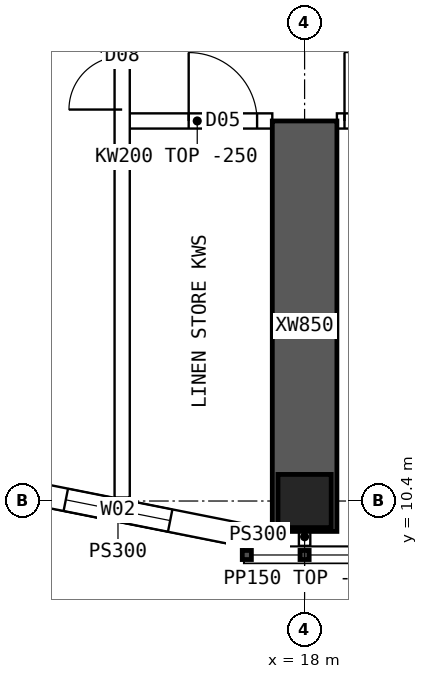
"""IFC4 building model, lengths in metres.
Left out: names, types, materials, properties, quantities, classifications, styles, units other than length and angle.
Written with IfcOpenShell. Run it as: python <this file> out.ifc"""

import sys

from ifc_helpers import new_model, si_unit, direction, frame, frame_2d, origin, origin_2d, place, context, subcontext, project, spatial, polyline, rectangle, hollow_rectangle, outline, extrude, element, fill, save


model = new_model("IFC4")
c1 = context("Model", 3, precision=1e-05, world=origin(), true_north=direction((0.0, 1.0)))
c2 = subcontext(c1, "Body", "Model", "MODEL_VIEW")
j1 = project(units=[si_unit("LENGTHUNIT", "METRE"), si_unit("PLANEANGLEUNIT", "RADIAN")], contexts=[c1])
p1 = place(None, origin())
s1 = spatial("IfcSite", under=j1, at=p1, CompositionType="ELEMENT")
p2 = place(p1, origin())
s2 = spatial("IfcBuilding", under=s1, at=p2, CompositionType="ELEMENT")
p3 = place(p2, frame((0.0, 0.0, 193.6)))
s3 = spatial("IfcBuildingStorey", under=s2, at=p3, CompositionType="ELEMENT", Elevation=193.6)
p4 = place(p3, frame((18.0, 10.4, 0.0), z_axis=(0.0, 0.0, 1.0), x_axis=(1.0, 0.0, 0.0)))
e1 = element("IfcColumn", 1, at=p4, inside=s3, PredefinedType="COLUMN", context=c2, shape_type="SweptSolid", body=[
    extrude(hollow_rectangle(XDim=0.7, YDim=0.7, WallThickness=0.07, at=origin_2d()), origin(), (0.0, 0.0, 1.0), 3.75),
])
p5 = place(p3, frame((18.0, 10.0, 0.0), z_axis=(0.0, 0.0, 1.0), x_axis=(0.0, 1.0, 0.0)))
e2 = element("IfcWall", 2, at=p5, inside=s3, PredefinedType="SHEAR", context=c2, shape_type="SweptSolid", body=[
    extrude(rectangle(XDim=5.4, YDim=0.85, at=frame_2d((2.7, 0.0))), origin(), (0.0, 0.0, 1.0), 3.75),
])
p6 = place(p3, frame((13.89, 10.608, 0.0), z_axis=(0.0, 0.0, 1.0), x_axis=(0.98078325777, -0.195100490205, 0.0)))
e3 = element("IfcWall", 3, at=p6, inside=s3, PredefinedType="SOLIDWALL", context=c2, shape_type="SweptSolid", body=[
    extrude(outline(polyline([(-0.03, -0.15), (3.405, -0.15), (3.345, 0.15), (0.03, 0.15), (-0.03, -0.15)])), origin(), (0.0, 0.0, 1.0), 3.5),
])
p7 = place(p6, frame((0.988, 0.0, 0.9)))
e4 = element("IfcOpeningElement", 4, at=p7, cuts=e3, PredefinedType="OPENING", context=c2, shape_type="SweptSolid", body=[
    extrude(rectangle(XDim=1.4, YDim=1.8, at=frame_2d((0.7, 0.9))), frame((0.0, 0.16, 0.0), z_axis=(0.0, -1.0, 0.0), x_axis=(1.0, 0.0, 0.0)), (0.0, 0.0, 1.0), 0.32),
])
p8 = place(p3, frame((17.2, 9.95, 0.0), z_axis=(0.0, 0.0, 1.0), x_axis=(1.0, 0.0, 0.0)))
e5 = element("IfcWall", 5, at=p8, inside=s3, PredefinedType="SOLIDWALL", context=c2, shape_type="SweptSolid", body=[
    extrude(rectangle(XDim=0.375, YDim=0.3, at=frame_2d((0.188, 0.0))), origin(), (0.0, 0.0, 1.0), 3.5),
])
p9 = place(p3, frame((15.6, 15.4, 0.0), z_axis=(0.0, 0.0, 1.0), x_axis=(1.0, 0.0, 0.0)))
e6 = element("IfcWall", 6, at=p9, inside=s3, PredefinedType="SOLIDWALL", context=c2, shape_type="SweptSolid", body=[
    extrude(rectangle(XDim=1.975, YDim=0.2, at=frame_2d((0.987, 0.0))), origin(), (0.0, 0.0, 1.0), 3.5),
])
p10 = place(p9, frame((0.875, 0.0, 0.0)))
e7 = element("IfcOpeningElement", 7, at=p10, cuts=e6, PredefinedType="OPENING", context=c2, shape_type="SweptSolid", body=[
    extrude(rectangle(XDim=0.9, YDim=2.1, at=frame_2d((0.45, 1.05))), frame((0.0, 0.11, 0.0), z_axis=(0.0, -1.0, 0.0), x_axis=(1.0, 0.0, 0.0)), (0.0, 0.0, 1.0), 0.22),
])
p11 = place(p3, frame((18.425, 15.4, 0.0), z_axis=(0.0, 0.0, 1.0), x_axis=(1.0, 0.0, 0.0)))
e8 = element("IfcWall", 8, at=p11, inside=s3, PredefinedType="SOLIDWALL", context=c2, shape_type="SweptSolid", body=[
    extrude(outline(polyline([(0.0, 0.0), (5.15, 0.0), (5.15, 3.1), (0.0, 3.1), (0.0, 0.0)])), frame((0.0, 0.1, 0.0), z_axis=(0.0, -1.0, 0.0), x_axis=(1.0, 0.0, 0.0)), (0.0, 0.0, 1.0), 0.2),
])
p12 = place(p11, frame((0.1, 0.0, 0.0)))
e9 = element("IfcOpeningElement", 9, at=p12, cuts=e8, PredefinedType="OPENING", context=c2, shape_type="SweptSolid", body=[
    extrude(rectangle(XDim=0.9, YDim=2.1, at=frame_2d((0.45, 1.05))), frame((0.0, 0.11, 0.0), z_axis=(0.0, -1.0, 0.0), x_axis=(1.0, 0.0, 0.0)), (0.0, 0.0, 1.0), 0.22),
])
p13 = place(p3, frame((15.6, 10.446, 0.0), z_axis=(0.0, 0.0, 1.0), x_axis=(0.0, 1.0, 0.0)))
e10 = element("IfcWall", 10, at=p13, inside=s3, PredefinedType="SOLIDWALL", context=c2, shape_type="SweptSolid", body=[
    extrude(rectangle(XDim=43.107, YDim=0.2, at=frame_2d((21.554, 0.0))), origin(), (0.0, 0.0, 1.0), 3.5),
])
p14 = place(p13, frame((5.104, 0.0, 0.0)))
e11 = element("IfcOpeningElement", 11, at=p14, cuts=e10, PredefinedType="OPENING", context=c2, shape_type="SweptSolid", body=[
    extrude(rectangle(XDim=1.4, YDim=2.1, at=frame_2d((0.7, 1.05))), frame((0.0, 0.11, 0.0), z_axis=(0.0, -1.0, 0.0), x_axis=(1.0, 0.0, 0.0)), (0.0, 0.0, 1.0), 0.22),
])
p15 = place(p13, frame((36.504, 0.0, 0.0)))
e12 = element("IfcOpeningElement", 12, at=p15, cuts=e10, PredefinedType="OPENING", context=c2, shape_type="SweptSolid", body=[
    extrude(rectangle(XDim=1.4, YDim=2.1, at=frame_2d((0.7, 1.05))), frame((0.0, 0.11, 0.0), z_axis=(0.0, -1.0, 0.0), x_axis=(1.0, 0.0, 0.0)), (0.0, 0.0, 1.0), 0.22),
])
p16 = place(p3, frame((18.0, 10.05, 0.0), z_axis=(0.0, 0.0, 1.0), x_axis=(0.0, -1.0, 0.0)))
e13 = element("IfcWall", 13, at=p16, inside=s3, PredefinedType="PARTITIONING", context=c2, shape_type="SweptSolid", body=[
    extrude(rectangle(XDim=0.24, YDim=0.15, at=frame_2d((0.12, 0.0))), origin(), (0.0, 0.0, 1.0), 3.5),
])
p17 = place(p7, origin())
e14 = element("IfcWindow", 14, at=p17, inside=s3, PartitioningType="SINGLE_PANEL", PredefinedType="WINDOW", context=c2, shape_type="SweptSolid", body=[
    extrude(rectangle(XDim=1.4, YDim=1.8, at=frame_2d((0.7, 0.9))), frame((0.0, 0.03, 0.0), z_axis=(0.0, -1.0, 0.0), x_axis=(1.0, 0.0, 0.0)), (0.0, 0.0, 1.0), 0.06),
])
fill(e4, e14)
p18 = place(p12, origin())
e15 = element("IfcDoor", 15, at=p18, inside=s3, OperationType="SINGLE_SWING_LEFT", PredefinedType="DOOR", context=c2, shape_type="SweptSolid", body=[
    extrude(rectangle(XDim=0.9, YDim=2.1, at=frame_2d((0.45, 1.05))), frame((0.0, 0.025, 0.0), z_axis=(0.0, -1.0, 0.0), x_axis=(1.0, 0.0, 0.0)), (0.0, 0.0, 1.0), 0.05),
])
fill(e9, e15)
p19 = place(p14, origin())
e16 = element("IfcDoor", 16, at=p19, inside=s3, OperationType="DOUBLE_DOOR_SINGLE_SWING", PredefinedType="DOOR", context=c2, shape_type="SweptSolid", body=[
    extrude(rectangle(XDim=1.4, YDim=2.1, at=frame_2d((0.7, 1.05))), frame((0.0, 0.025, 0.0), z_axis=(0.0, -1.0, 0.0), x_axis=(1.0, 0.0, 0.0)), (0.0, 0.0, 1.0), 0.05),
])
fill(e11, e16)
p20 = place(p10, origin())
e17 = element("IfcDoor", 17, at=p20, inside=s3, OperationType="SINGLE_SWING_LEFT", PredefinedType="DOOR", context=c2, shape_type="SweptSolid", body=[
    extrude(rectangle(XDim=0.9, YDim=2.1, at=frame_2d((0.45, 1.05))), frame((0.0, 0.025, 0.0), z_axis=(0.0, -1.0, 0.0), x_axis=(1.0, 0.0, 0.0)), (0.0, 0.0, 1.0), 0.05),
])
fill(e7, e17)
save(model, sys.argv[1])
